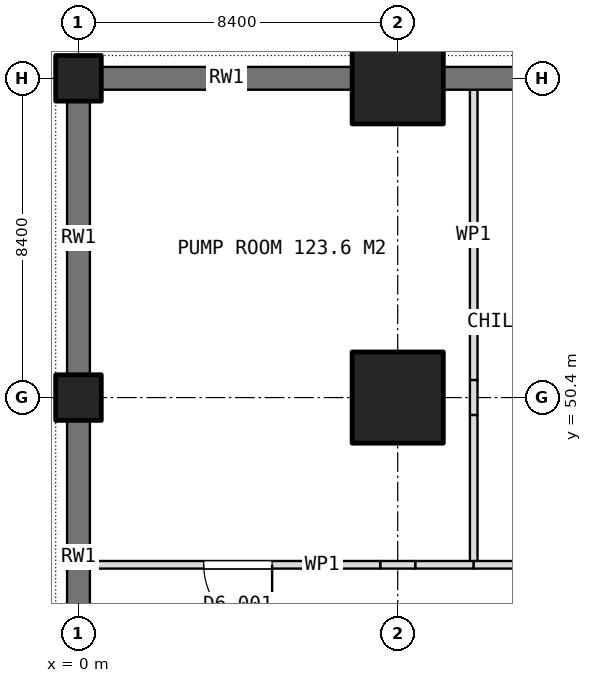
"""IFC4 building model, lengths in metres.
Left out: names, types, materials, properties, quantities, classifications, styles, units other than length and angle.
Written with IfcOpenShell. Run it as: python <this file> out.ifc"""

import sys

from ifc_helpers import new_model, si_unit, direction, frame, frame_2d, origin, origin_2d, place, context, subcontext, project, spatial, rectangle, extrude, element, fill, save


model = new_model("IFC4")
c1 = context("Model", 3, precision=1e-05, world=origin(), true_north=direction((0.0, 1.0)))
c2 = subcontext(c1, "Body", "Model", "MODEL_VIEW")
j1 = project(units=[si_unit("LENGTHUNIT", "METRE"), si_unit("PLANEANGLEUNIT", "RADIAN")], contexts=[c1])
p1 = place(None, origin())
s1 = spatial("IfcSite", under=j1, at=p1, CompositionType="ELEMENT")
p2 = place(p1, origin())
s2 = spatial("IfcBuilding", under=s1, at=p2, CompositionType="ELEMENT")
p3 = place(p2, frame((0.0, 0.0, -9.9)))
s3 = spatial("IfcBuildingStorey", under=s2, at=p3, CompositionType="ELEMENT", Elevation=-9.9)
for number, where, z_axis, x_axis in (
    (1, (0.0, 50.4, 0.0), (0.0, 0.0, 1.0), (1.0, 0.0, 0.0)),
    (2, (0.0, 58.8, 0.0), (0.0, 0.0, 1.0), (1.0, 0.0, 0.0)),
):
    element("IfcColumn", number, at=place(p3, frame(where, z_axis=z_axis, x_axis=x_axis)), inside=s3, PredefinedType="COLUMN", context=c2, shape_type="SweptSolid", body=[
        extrude(rectangle(XDim=1.2, YDim=1.2, at=origin_2d()), origin(), (0.0, 0.0, 1.0), 4.5),
    ])
for number, where, z_axis, x_axis in (
    (3, (8.4, 50.4, 0.0), (0.0, 0.0, 1.0), (1.0, 0.0, 0.0)),
    (4, (8.4, 58.8, 0.0), (0.0, 0.0, 1.0), (1.0, 0.0, 0.0)),
):
    element("IfcColumn", number, at=place(p3, frame(where, z_axis=z_axis, x_axis=x_axis)), inside=s3, PredefinedType="COLUMN", context=c2, shape_type="SweptSolid", body=[
        extrude(rectangle(XDim=2.4, YDim=2.4, at=origin_2d()), origin(), (0.0, 0.0, 1.0), 4.5),
    ])
p4 = place(p3, frame((0.6, 58.8, 0.0), z_axis=(0.0, 0.0, 1.0), x_axis=(1.0, 0.0, 0.0)))
e5 = element("IfcWall", 5, at=p4, inside=s3, PredefinedType="SOLIDWALL", context=c2, shape_type="SweptSolid", body=[
    extrude(rectangle(XDim=6.6, YDim=0.6, at=frame_2d((3.3, 0.0))), origin(), (0.0, 0.0, 1.0), 4.2),
])
p5 = place(p3, frame((9.6, 58.8, 0.0), z_axis=(0.0, 0.0, 1.0), x_axis=(1.0, 0.0, 0.0)))
e6 = element("IfcWall", 6, at=p5, inside=s3, PredefinedType="SOLIDWALL", context=c2, shape_type="SweptSolid", body=[
    extrude(rectangle(XDim=6.0, YDim=0.6, at=frame_2d((3.0, 0.0))), origin(), (0.0, 0.0, 1.0), 4.2),
])
for number, where, z_axis, x_axis in (
    (7, (0.0, 42.6, 0.0), (0.0, 0.0, 1.0), (0.0, 1.0, 0.0)),
    (8, (0.0, 51.0, 0.0), (0.0, 0.0, 1.0), (0.0, 1.0, 0.0)),
):
    element("IfcWall", number, at=place(p3, frame(where, z_axis=z_axis, x_axis=x_axis)), inside=s3, PredefinedType="SOLIDWALL", context=c2, shape_type="SweptSolid", body=[
        extrude(rectangle(XDim=7.2, YDim=0.6, at=frame_2d((3.6, 0.0))), origin(), (0.0, 0.0, 1.0), 4.2),
    ])
p6 = place(p3, frame((10.4, 58.5, 0.0), z_axis=(0.0, 0.0, 1.0), x_axis=(0.0, -1.0, 0.0)))
e9 = element("IfcWall", 9, at=p6, inside=s3, PredefinedType="PARTITIONING", context=c2, shape_type="SweptSolid", body=[
    extrude(rectangle(XDim=7.64, YDim=0.2, at=frame_2d((3.82, 0.0))), origin(), (0.0, 0.0, 1.0), 4.2),
])
p7 = place(p3, frame((10.4, 50.86, 0.0), z_axis=(0.0, 0.0, 1.0), x_axis=(0.0, -1.0, 0.0)))
e10 = element("IfcWall", 10, at=p7, inside=s3, PredefinedType="PARTITIONING", context=c2, shape_type="SweptSolid", body=[
    extrude(rectangle(XDim=0.92, YDim=0.2, at=frame_2d((0.46, 0.0))), origin(), (0.0, 0.0, 1.0), 2.4),
])
p8 = place(p3, frame((10.4, 49.94, 0.0), z_axis=(0.0, 0.0, 1.0), x_axis=(0.0, -1.0, 0.0)))
e11 = element("IfcWall", 11, at=p8, inside=s3, PredefinedType="PARTITIONING", context=c2, shape_type="SweptSolid", body=[
    extrude(rectangle(XDim=3.94, YDim=0.2, at=frame_2d((1.97, 0.0))), origin(), (0.0, 0.0, 1.0), 4.2),
])
p9 = place(p3, frame((10.4, 46.0, 0.0), z_axis=(0.0, 0.0, 1.0), x_axis=(-1.0, 0.0, 0.0)))
e12 = element("IfcWall", 12, at=p9, inside=s3, PredefinedType="PARTITIONING", context=c2, shape_type="SweptSolid", body=[
    extrude(rectangle(XDim=1.54, YDim=0.2, at=frame_2d((0.77, 0.0))), origin(), (0.0, 0.0, 1.0), 4.2),
])
p10 = place(p3, frame((8.86, 46.0, 0.0), z_axis=(0.0, 0.0, 1.0), x_axis=(-1.0, 0.0, 0.0)))
e13 = element("IfcWall", 13, at=p10, inside=s3, PredefinedType="PARTITIONING", context=c2, shape_type="SweptSolid", body=[
    extrude(rectangle(XDim=0.92, YDim=0.2, at=frame_2d((0.46, 0.0))), origin(), (0.0, 0.0, 1.0), 2.4),
])
p11 = place(p3, frame((7.94, 46.0, 0.0), z_axis=(0.0, 0.0, 1.0), x_axis=(-1.0, 0.0, 0.0)))
e14 = element("IfcWall", 14, at=p11, inside=s3, PredefinedType="PARTITIONING", context=c2, shape_type="SweptSolid", body=[
    extrude(rectangle(XDim=7.64, YDim=0.2, at=frame_2d((3.82, 0.0))), origin(), (0.0, 0.0, 1.0), 4.2),
])
p12 = place(p11, frame((2.845, 0.0, 0.0)))
e15 = element("IfcOpeningElement", 15, at=p12, cuts=e14, PredefinedType="OPENING", context=c2, shape_type="SweptSolid", body=[
    extrude(rectangle(XDim=1.8, YDim=2.1, at=frame_2d((0.9, 1.05))), frame((0.0, 0.11, 0.0), z_axis=(0.0, -1.0, 0.0), x_axis=(1.0, 0.0, 0.0)), (0.0, 0.0, 1.0), 0.22),
])
p13 = place(p3, frame((16.34, 46.0, 0.0), z_axis=(0.0, 0.0, 1.0), x_axis=(-1.0, 0.0, 0.0)))
e16 = element("IfcWall", 16, at=p13, inside=s3, PredefinedType="PARTITIONING", context=c2, shape_type="SweptSolid", body=[
    extrude(rectangle(XDim=5.94, YDim=0.2, at=frame_2d((2.97, 0.0))), origin(), (0.0, 0.0, 1.0), 4.2),
])
p14 = place(p12, origin())
e17 = element("IfcDoor", 17, at=p14, inside=s3, OperationType="DOUBLE_DOOR_SINGLE_SWING", PredefinedType="DOOR", context=c2, shape_type="SweptSolid", body=[
    extrude(rectangle(XDim=1.8, YDim=2.1, at=frame_2d((0.9, 1.05))), frame((0.0, 0.025, 0.0), z_axis=(0.0, -1.0, 0.0), x_axis=(1.0, 0.0, 0.0)), (0.0, 0.0, 1.0), 0.05),
])
fill(e15, e17)
save(model, sys.argv[1])
